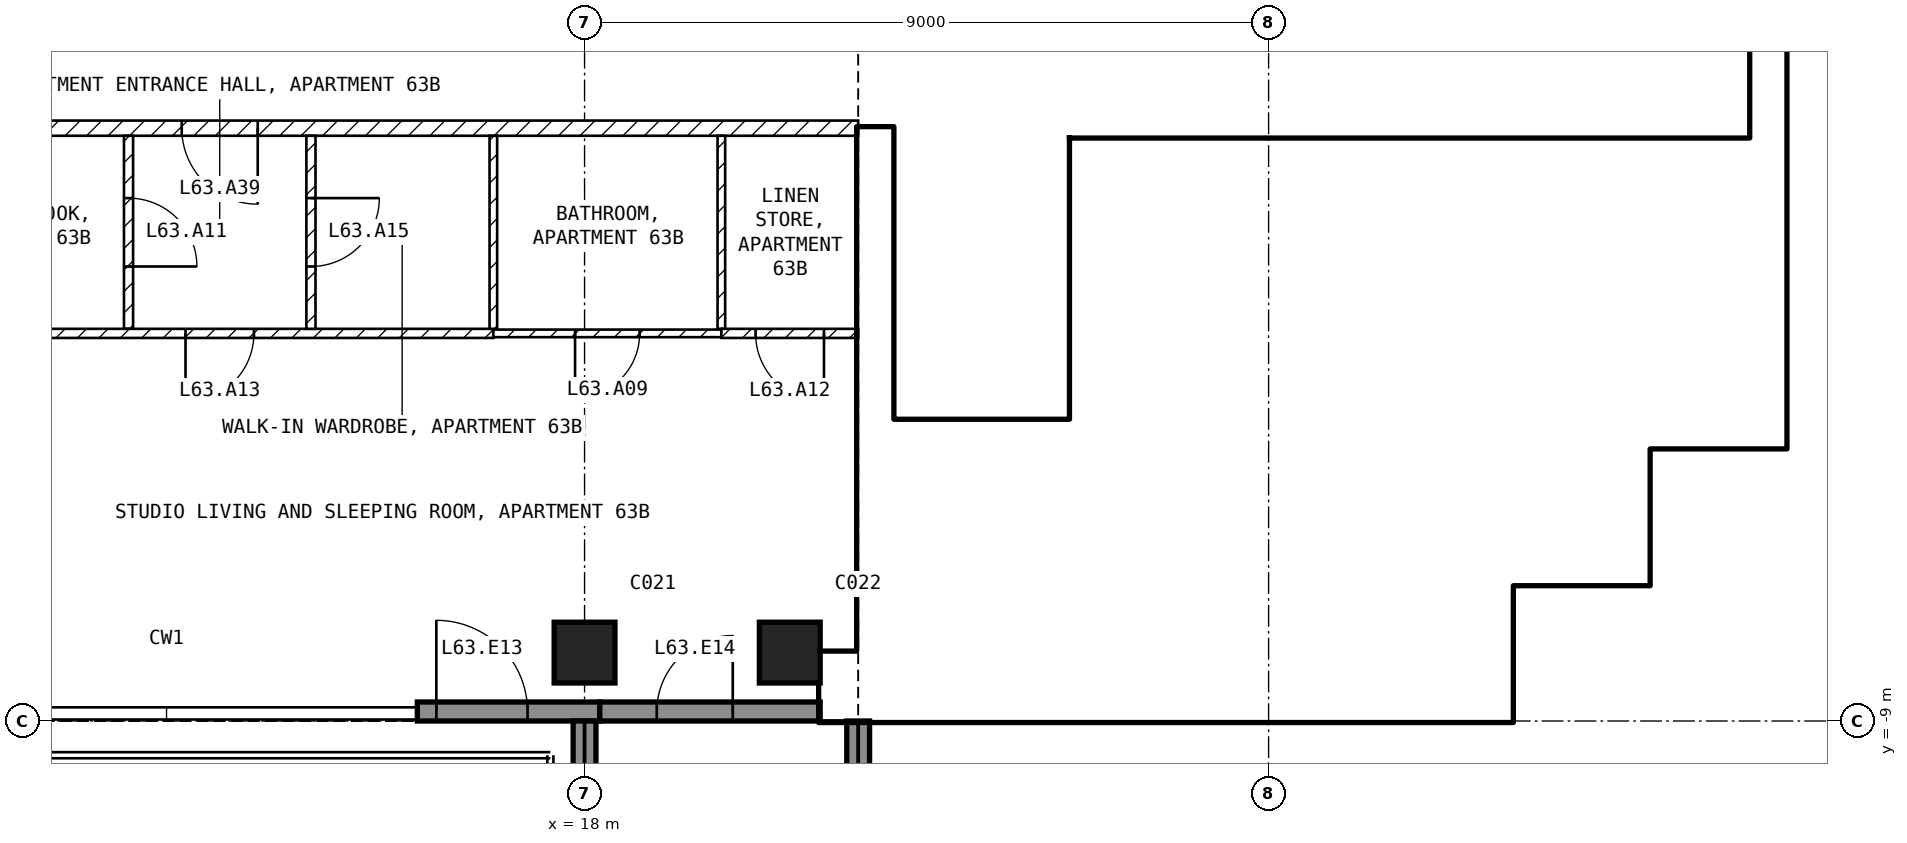
"""IFC4 building model, lengths in metres.
Left out: names, types, materials, properties, quantities, classifications, styles, units other than length and angle.
Written with IfcOpenShell. Run it as: python <this file> out.ifc"""

import sys

from ifc_helpers import new_model, si_unit, direction, frame, frame_2d, origin, origin_2d, place, context, subcontext, project, spatial, rectangle, extrude, element, fill, save


model = new_model("IFC4")
c1 = context("Model", 3, precision=1e-05, world=origin(), true_north=direction((0.0, 1.0)))
c2 = subcontext(c1, "Body", "Model", "MODEL_VIEW")
j1 = project(units=[si_unit("LENGTHUNIT", "METRE"), si_unit("PLANEANGLEUNIT", "RADIAN")], contexts=[c1])
p1 = place(None, origin())
s1 = spatial("IfcSite", under=j1, at=p1, CompositionType="ELEMENT")
p2 = place(p1, origin())
s2 = spatial("IfcBuilding", under=s1, at=p2, CompositionType="ELEMENT")
p3 = place(p2, frame((0.0, 0.0, 250.0)))
s3 = spatial("IfcBuildingStorey", under=s2, at=p3, CompositionType="ELEMENT", Elevation=250.0)
for number, where, z_axis, x_axis in (
    (1, (18.0, -8.1, -0.25), (0.0, 0.0, 1.0), (1.0, 0.0, 0.0)),
    (2, (20.7, -8.1, -0.25), (0.0, 0.0, 1.0), (1.0, 0.0, 0.0)),
):
    element("IfcColumn", number, at=place(p3, frame(where, z_axis=z_axis, x_axis=x_axis)), inside=s3, PredefinedType="COLUMN", context=c2, shape_type="SweptSolid", body=[
        extrude(rectangle(XDim=0.8, YDim=0.8, at=origin_2d()), origin(), (0.0, 0.0, 1.0), 3.5),
    ])
p4 = place(p3, frame((15.8, -8.875, 0.0), z_axis=(0.0, 0.0, 1.0), x_axis=(1.0, 0.0, 0.0)))
e3 = element("IfcWall", 3, at=p4, inside=s3, PredefinedType="SOLIDWALL", context=c2, shape_type="SweptSolid", body=[
    extrude(rectangle(XDim=2.4, YDim=0.25, at=frame_2d((1.2, 0.0))), origin(), (0.0, 0.0, 1.0), 3.25),
])
p5 = place(p4, frame((0.25, 0.0, 0.0)))
e4 = element("IfcOpeningElement", 4, at=p5, cuts=e3, PredefinedType="OPENING", context=c2, shape_type="SweptSolid", body=[
    extrude(rectangle(XDim=1.2, YDim=2.4, at=frame_2d((0.6, 1.2))), frame((0.0, 0.135, 0.0), z_axis=(0.0, -1.0, 0.0), x_axis=(1.0, 0.0, 0.0)), (0.0, 0.0, 1.0), 0.27),
])
p6 = place(p3, frame((18.2, -8.875, 0.0), z_axis=(0.0, 0.0, 1.0), x_axis=(1.0, 0.0, 0.0)))
e5 = element("IfcWall", 5, at=p6, inside=s3, PredefinedType="SOLIDWALL", context=c2, shape_type="SweptSolid", body=[
    extrude(rectangle(XDim=2.9, YDim=0.25, at=frame_2d((1.45, 0.0))), origin(), (0.0, 0.0, 1.0), 3.25),
])
p7 = place(p6, frame((0.75, 0.0, 0.0)))
e6 = element("IfcOpeningElement", 6, at=p7, cuts=e5, PredefinedType="OPENING", context=c2, shape_type="SweptSolid", body=[
    extrude(rectangle(XDim=1.0, YDim=2.4, at=frame_2d((0.5, 1.2))), frame((0.0, 0.135, 0.0), z_axis=(0.0, -1.0, 0.0), x_axis=(1.0, 0.0, 0.0)), (0.0, 0.0, 1.0), 0.27),
])
p8 = place(p3, frame((18.0, -9.0, 0.0), z_axis=(0.0, 0.0, 1.0), x_axis=(0.0, -1.0, 0.0)))
e7 = element("IfcWall", 7, at=p8, inside=s3, PredefinedType="SOLIDWALL", context=c2, shape_type="SweptSolid", body=[
    extrude(rectangle(XDim=2.74, YDim=0.3, at=frame_2d((1.37, 0.0))), origin(), (0.0, 0.0, 1.0), 3.25),
])
p9 = place(p3, frame((21.6, -9.0, 0.0), z_axis=(0.0, 0.0, 1.0), x_axis=(0.0, -1.0, 0.0)))
e8 = element("IfcWall", 8, at=p9, inside=s3, PredefinedType="SOLIDWALL", context=c2, shape_type="SweptSolid", body=[
    extrude(rectangle(XDim=2.7, YDim=0.3, at=frame_2d((1.35, 0.0))), origin(), (0.0, 0.0, 1.0), 3.25),
])
p10 = place(p3, frame((21.1, -8.55, 0.0), z_axis=(0.0, 0.0, 1.0), x_axis=(1.0, 0.0, 0.0)))
e9 = element("IfcWall", 9, at=p10, inside=s3, PredefinedType="SHEAR", context=c2, shape_type="SweptSolid", body=[
    extrude(rectangle(XDim=9.1, YDim=0.9, at=frame_2d((4.55, 0.0))), origin(), (0.0, 0.0, 1.0), 3.25),
])
p11 = place(p3, frame((29.975, -8.1, 0.0), z_axis=(0.0, 0.0, 1.0), x_axis=(0.0, 1.0, 0.0)))
e10 = element("IfcWall", 10, at=p11, inside=s3, PredefinedType="SHEAR", context=c2, shape_type="SweptSolid", body=[
    extrude(rectangle(XDim=1.35, YDim=0.45, at=frame_2d((0.675, 0.0))), origin(), (0.0, 0.0, 1.0), 3.25),
])
for number, where, z_axis, x_axis in (
    (11, (30.2, -6.975, 0.0), (0.0, 0.0, 1.0), (1.0, 0.0, 0.0)),
    (12, (31.775, -6.75, 0.0), (0.0, 0.0, 1.0), (0.0, 1.0, 0.0)),
    (13, (32.0, -5.175, 0.0), (0.0, 0.0, 1.0), (1.0, 0.0, 0.0)),
):
    element("IfcWall", number, at=place(p3, frame(where, z_axis=z_axis, x_axis=x_axis)), inside=s3, PredefinedType="SHEAR", context=c2, shape_type="SweptSolid", body=[
        extrude(rectangle(XDim=1.8, YDim=0.45, at=frame_2d((0.9, 0.0))), origin(), (0.0, 0.0, 1.0), 3.25),
    ])
p12 = place(p3, frame((33.575, -4.95, 0.0), z_axis=(0.0, 0.0, 1.0), x_axis=(0.0, 1.0, 0.0)))
e14 = element("IfcWall", 14, at=p12, inside=s3, PredefinedType="SHEAR", context=c2, shape_type="SweptSolid", body=[
    extrude(rectangle(XDim=10.35, YDim=0.45, at=frame_2d((5.175, 0.0))), origin(), (0.0, 0.0, 1.0), 3.25),
])
p13 = place(p3, frame((21.825, -8.1, 0.0), z_axis=(0.0, 0.0, 1.0), x_axis=(0.0, 1.0, 0.0)))
e15 = element("IfcWall", 15, at=p13, inside=s3, PredefinedType="SHEAR", context=c2, shape_type="SweptSolid", body=[
    extrude(rectangle(XDim=6.9, YDim=0.45, at=frame_2d((3.45, 0.0))), origin(), (0.0, 0.0, 1.0), 3.25),
])
p14 = place(p3, frame((24.5, -5.05, 0.0), z_axis=(0.0, 0.0, 1.0), x_axis=(0.0, 1.0, 0.0)))
e16 = element("IfcWall", 16, at=p14, inside=s3, PredefinedType="SOLIDWALL", context=c2, shape_type="SweptSolid", body=[
    extrude(rectangle(XDim=3.7, YDim=0.2, at=frame_2d((1.85, 0.0))), origin(), (0.0, 0.0, 1.0), 3.25),
])
p15 = place(p14, frame((0.1, 0.0, 0.0)))
e17 = element("IfcOpeningElement", 17, at=p15, cuts=e16, PredefinedType="OPENING", context=c2, shape_type="SweptSolid", body=[
    extrude(rectangle(XDim=0.8, YDim=2.1, at=frame_2d((0.4, 1.05))), frame((0.0, 0.11, 0.0), z_axis=(0.0, -1.0, 0.0), x_axis=(1.0, 0.0, 0.0)), (0.0, 0.0, 1.0), 0.22),
])
p16 = place(p3, frame((22.05, -5.15, 0.0), z_axis=(0.0, 0.0, 1.0), x_axis=(1.0, 0.0, 0.0)))
e18 = element("IfcWall", 18, at=p16, inside=s3, PredefinedType="SOLIDWALL", context=c2, shape_type="SweptSolid", body=[
    extrude(rectangle(XDim=6.3, YDim=0.2, at=frame_2d((3.15, 0.0))), origin(), (0.0, 0.0, 1.0), 3.25),
])
p17 = place(p16, frame((0.2, 0.0, 0.0)))
e19 = element("IfcOpeningElement", 19, at=p17, cuts=e18, PredefinedType="OPENING", context=c2, shape_type="SweptSolid", body=[
    extrude(rectangle(XDim=1.0, YDim=2.1, at=frame_2d((0.5, 1.05))), frame((0.0, 0.11, 0.0), z_axis=(0.0, -1.0, 0.0), x_axis=(1.0, 0.0, 0.0)), (0.0, 0.0, 1.0), 0.22),
])
p18 = place(p3, frame((28.25, -8.1, 0.0), z_axis=(0.0, 0.0, 1.0), x_axis=(0.0, 1.0, 0.0)))
e20 = element("IfcWall", 20, at=p18, inside=s3, PredefinedType="SOLIDWALL", context=c2, shape_type="SweptSolid", body=[
    extrude(rectangle(XDim=2.85, YDim=0.2, at=frame_2d((1.425, 0.0))), origin(), (0.0, 0.0, 1.0), 3.25),
])
p19 = place(p3, frame((24.6, -1.45, 0.0), z_axis=(0.0, 0.0, 1.0), x_axis=(1.0, 0.0, 0.0)))
e21 = element("IfcWall", 21, at=p19, inside=s3, PredefinedType="SOLIDWALL", context=c2, shape_type="SweptSolid", body=[
    extrude(rectangle(XDim=8.75, YDim=0.2, at=frame_2d((4.375, 0.0))), origin(), (0.0, 0.0, 1.0), 3.25),
])
p20 = place(p19, frame((0.4, 0.0, 0.0)))
e22 = element("IfcOpeningElement", 22, at=p20, cuts=e21, PredefinedType="OPENING", context=c2, shape_type="SweptSolid", body=[
    extrude(rectangle(XDim=1.0, YDim=2.1, at=frame_2d((0.5, 1.05))), frame((0.0, 0.11, 0.0), z_axis=(0.0, -1.0, 0.0), x_axis=(1.0, 0.0, 0.0)), (0.0, 0.0, 1.0), 0.22),
])
p21 = place(p19, frame((2.4, 0.0, 0.0)))
e23 = element("IfcOpeningElement", 23, at=p21, cuts=e21, PredefinedType="OPENING", context=c2, shape_type="SweptSolid", body=[
    extrude(rectangle(XDim=1.0, YDim=2.1, at=frame_2d((0.5, 1.05))), frame((0.0, 0.11, 0.0), z_axis=(0.0, -1.0, 0.0), x_axis=(1.0, 0.0, 0.0)), (0.0, 0.0, 1.0), 0.22),
])
p22 = place(p19, frame((4.4, 0.0, 0.0)))
e24 = element("IfcOpeningElement", 24, at=p22, cuts=e21, PredefinedType="OPENING", context=c2, shape_type="SweptSolid", body=[
    extrude(rectangle(XDim=1.0, YDim=2.1, at=frame_2d((0.5, 1.05))), frame((0.0, 0.11, 0.0), z_axis=(0.0, -1.0, 0.0), x_axis=(1.0, 0.0, 0.0)), (0.0, 0.0, 1.0), 0.22),
])
p23 = place(p19, frame((6.925, 0.0, 0.0)))
e25 = element("IfcOpeningElement", 25, at=p23, cuts=e21, PredefinedType="OPENING", context=c2, shape_type="SweptSolid", body=[
    extrude(rectangle(XDim=0.9, YDim=2.1, at=frame_2d((0.45, 1.05))), frame((0.0, 0.11, 0.0), z_axis=(0.0, -1.0, 0.0), x_axis=(1.0, 0.0, 0.0)), (0.0, 0.0, 1.0), 0.22),
])
p24 = place(p3, frame((24.6, -3.95, 0.0), z_axis=(0.0, 0.0, 1.0), x_axis=(1.0, 0.0, 0.0)))
e26 = element("IfcWall", 26, at=p24, inside=s3, PredefinedType="SOLIDWALL", context=c2, shape_type="SweptSolid", body=[
    extrude(rectangle(XDim=8.75, YDim=0.2, at=frame_2d((4.375, 0.0))), origin(), (0.0, 0.0, 1.0), 3.25),
])
for number, where, z_axis, x_axis in (
    (27, (26.5, -3.85, 0.0), (0.0, 0.0, 1.0), (0.0, 1.0, 0.0)),
    (28, (28.5, -3.85, 0.0), (0.0, 0.0, 1.0), (0.0, 1.0, 0.0)),
    (29, (30.5, -3.85, 0.0), (0.0, 0.0, 1.0), (0.0, 1.0, 0.0)),
):
    element("IfcWall", number, at=place(p3, frame(where, z_axis=z_axis, x_axis=x_axis)), inside=s3, PredefinedType="SOLIDWALL", context=c2, shape_type="SweptSolid", body=[
        extrude(rectangle(XDim=2.3, YDim=0.2, at=frame_2d((1.15, 0.0))), origin(), (0.0, 0.0, 1.0), 3.25),
    ])
p25 = place(p3, frame((21.6, -1.2, 0.0), z_axis=(0.0, 0.0, 1.0), x_axis=(-1.0, 0.0, 0.0)))
e30 = element("IfcWall", 30, at=p25, inside=s3, PredefinedType="PARTITIONING", context=c2, shape_type="SweptSolid", body=[
    extrude(rectangle(XDim=17.2, YDim=0.2, at=frame_2d((8.6, 0.0))), origin(), (0.0, 0.0, 1.0), 3.25),
])
p26 = place(p25, frame((7.9, 0.0, 0.0)))
e31 = element("IfcOpeningElement", 31, at=p26, cuts=e30, PredefinedType="OPENING", context=c2, shape_type="SweptSolid", body=[
    extrude(rectangle(XDim=1.0, YDim=2.1, at=frame_2d((0.5, 1.05))), frame((0.0, 0.11, 0.0), z_axis=(0.0, -1.0, 0.0), x_axis=(1.0, 0.0, 0.0)), (0.0, 0.0, 1.0), 0.22),
])
p27 = place(p3, frame((12.0, -1.3, 0.0), z_axis=(0.0, 0.0, 1.0), x_axis=(0.0, -1.0, 0.0)))
e32 = element("IfcWall", 32, at=p27, inside=s3, PredefinedType="PARTITIONING", context=c2, shape_type="SweptSolid", body=[
    extrude(rectangle(XDim=2.54, YDim=0.12, at=frame_2d((1.27, 0.0))), origin(), (0.0, 0.0, 1.0), 3.25),
])
p28 = place(p27, frame((0.82, 0.0, 0.0)))
e33 = element("IfcOpeningElement", 33, at=p28, cuts=e32, PredefinedType="OPENING", context=c2, shape_type="SweptSolid", body=[
    extrude(rectangle(XDim=0.9, YDim=2.1, at=frame_2d((0.45, 1.05))), frame((0.0, 0.07, 0.0), z_axis=(0.0, -1.0, 0.0), x_axis=(1.0, 0.0, 0.0)), (0.0, 0.0, 1.0), 0.14),
])
p29 = place(p3, frame((16.8, -3.9, 0.0), z_axis=(0.0, 0.0, 1.0), x_axis=(-1.0, 0.0, 0.0)))
e34 = element("IfcWall", 34, at=p29, inside=s3, PredefinedType="PARTITIONING", context=c2, shape_type="SweptSolid", body=[
    extrude(rectangle(XDim=7.86, YDim=0.12, at=frame_2d((3.93, 0.0))), origin(), (0.0, 0.0, 1.0), 3.25),
])
p30 = place(p29, frame((3.15, 0.0, 0.0)))
e35 = element("IfcOpeningElement", 35, at=p30, cuts=e34, PredefinedType="OPENING", context=c2, shape_type="SweptSolid", body=[
    extrude(rectangle(XDim=0.9, YDim=2.1, at=frame_2d((0.45, 1.05))), frame((0.0, 0.07, 0.0), z_axis=(0.0, -1.0, 0.0), x_axis=(1.0, 0.0, 0.0)), (0.0, 0.0, 1.0), 0.14),
])
p31 = place(p3, frame((14.4, -1.3, 0.0), z_axis=(0.0, 0.0, 1.0), x_axis=(0.0, -1.0, 0.0)))
e36 = element("IfcWall", 36, at=p31, inside=s3, PredefinedType="PARTITIONING", context=c2, shape_type="SweptSolid", body=[
    extrude(rectangle(XDim=2.54, YDim=0.12, at=frame_2d((1.27, 0.0))), origin(), (0.0, 0.0, 1.0), 3.25),
])
p32 = place(p31, frame((0.82, 0.0, 0.0)))
e37 = element("IfcOpeningElement", 37, at=p32, cuts=e36, PredefinedType="OPENING", context=c2, shape_type="SweptSolid", body=[
    extrude(rectangle(XDim=0.9, YDim=2.1, at=frame_2d((0.45, 1.05))), frame((0.0, 0.07, 0.0), z_axis=(0.0, -1.0, 0.0), x_axis=(1.0, 0.0, 0.0)), (0.0, 0.0, 1.0), 0.14),
])
for number, where, z_axis, x_axis in (
    (38, (16.8, -1.3, 0.0), (0.0, 0.0, 1.0), (0.0, -1.0, 0.0)),
    (39, (19.8, -1.3, 0.0), (0.0, 0.0, 1.0), (0.0, -1.0, 0.0)),
):
    element("IfcWall", number, at=place(p3, frame(where, z_axis=z_axis, x_axis=x_axis)), inside=s3, PredefinedType="PARTITIONING", context=c2, shape_type="SweptSolid", body=[
        extrude(rectangle(XDim=2.54, YDim=0.1, at=frame_2d((1.27, 0.0))), origin(), (0.0, 0.0, 1.0), 3.25),
    ])
p33 = place(p3, frame((19.8, -3.9, 0.0), z_axis=(0.0, 0.0, 1.0), x_axis=(-1.0, 0.0, 0.0)))
e40 = element("IfcWall", 40, at=p33, inside=s3, PredefinedType="PARTITIONING", context=c2, shape_type="SweptSolid", body=[
    extrude(rectangle(XDim=3.0, YDim=0.1, at=frame_2d((1.5, 0.0))), origin(), (0.0, 0.0, 1.0), 3.25),
])
p34 = place(p33, frame((1.075, 0.0, 0.0)))
e41 = element("IfcOpeningElement", 41, at=p34, cuts=e40, PredefinedType="OPENING", context=c2, shape_type="SweptSolid", body=[
    extrude(rectangle(XDim=0.85, YDim=2.1, at=frame_2d((0.425, 1.05))), frame((0.0, 0.06, 0.0), z_axis=(0.0, -1.0, 0.0), x_axis=(1.0, 0.0, 0.0)), (0.0, 0.0, 1.0), 0.12),
])
p35 = place(p3, frame((21.6, -3.9, 0.0), z_axis=(0.0, 0.0, 1.0), x_axis=(-1.0, 0.0, 0.0)))
e42 = element("IfcWall", 42, at=p35, inside=s3, PredefinedType="PARTITIONING", context=c2, shape_type="SweptSolid", body=[
    extrude(rectangle(XDim=1.8, YDim=0.12, at=frame_2d((0.9, 0.0))), origin(), (0.0, 0.0, 1.0), 3.25),
])
p36 = place(p35, frame((0.45, 0.0, 0.0)))
e43 = element("IfcOpeningElement", 43, at=p36, cuts=e42, PredefinedType="OPENING", context=c2, shape_type="SweptSolid", body=[
    extrude(rectangle(XDim=0.9, YDim=2.1, at=frame_2d((0.45, 1.05))), frame((0.0, 0.07, 0.0), z_axis=(0.0, -1.0, 0.0), x_axis=(1.0, 0.0, 0.0)), (0.0, 0.0, 1.0), 0.14),
])
p37 = place(p5, origin())
e44 = element("IfcDoor", 44, at=p37, inside=s3, OperationType="SINGLE_SWING_LEFT", PredefinedType="DOOR", context=c2, shape_type="SweptSolid", body=[
    extrude(rectangle(XDim=1.2, YDim=2.4, at=frame_2d((0.6, 1.2))), frame((0.0, 0.025, 0.0), z_axis=(0.0, -1.0, 0.0), x_axis=(1.0, 0.0, 0.0)), (0.0, 0.0, 1.0), 0.05),
])
fill(e4, e44)
p38 = place(p7, origin())
e45 = element("IfcDoor", 45, at=p38, inside=s3, OperationType="SINGLE_SWING_RIGHT", PredefinedType="DOOR", context=c2, shape_type="SweptSolid", body=[
    extrude(rectangle(XDim=1.0, YDim=2.4, at=frame_2d((0.5, 1.2))), frame((0.0, 0.025, 0.0), z_axis=(0.0, -1.0, 0.0), x_axis=(1.0, 0.0, 0.0)), (0.0, 0.0, 1.0), 0.05),
])
fill(e6, e45)
p39 = place(p20, origin())
e46 = element("IfcDoor", 46, at=p39, inside=s3, OperationType="DOUBLE_DOOR_SLIDING", PredefinedType="DOOR", context=c2, shape_type="SweptSolid", body=[
    extrude(rectangle(XDim=1.0, YDim=2.1, at=frame_2d((0.5, 1.05))), frame((0.0, 0.025, 0.0), z_axis=(0.0, -1.0, 0.0), x_axis=(1.0, 0.0, 0.0)), (0.0, 0.0, 1.0), 0.05),
])
fill(e22, e46)
p40 = place(p21, origin())
e47 = element("IfcDoor", 47, at=p40, inside=s3, OperationType="DOUBLE_DOOR_SLIDING", PredefinedType="DOOR", context=c2, shape_type="SweptSolid", body=[
    extrude(rectangle(XDim=1.0, YDim=2.1, at=frame_2d((0.5, 1.05))), frame((0.0, 0.025, 0.0), z_axis=(0.0, -1.0, 0.0), x_axis=(1.0, 0.0, 0.0)), (0.0, 0.0, 1.0), 0.05),
])
fill(e23, e47)
p41 = place(p22, origin())
e48 = element("IfcDoor", 48, at=p41, inside=s3, OperationType="DOUBLE_DOOR_SLIDING", PredefinedType="DOOR", context=c2, shape_type="SweptSolid", body=[
    extrude(rectangle(XDim=1.0, YDim=2.1, at=frame_2d((0.5, 1.05))), frame((0.0, 0.025, 0.0), z_axis=(0.0, -1.0, 0.0), x_axis=(1.0, 0.0, 0.0)), (0.0, 0.0, 1.0), 0.05),
])
fill(e24, e48)
p42 = place(p17, origin())
e49 = element("IfcDoor", 49, at=p42, inside=s3, OperationType="SINGLE_SWING_LEFT", PredefinedType="DOOR", context=c2, shape_type="SweptSolid", body=[
    extrude(rectangle(XDim=1.0, YDim=2.1, at=frame_2d((0.5, 1.05))), frame((0.0, 0.025, 0.0), z_axis=(0.0, -1.0, 0.0), x_axis=(1.0, 0.0, 0.0)), (0.0, 0.0, 1.0), 0.05),
])
fill(e19, e49)
p43 = place(p15, origin())
e50 = element("IfcDoor", 50, at=p43, inside=s3, OperationType="SINGLE_SWING_LEFT", PredefinedType="DOOR", context=c2, shape_type="SweptSolid", body=[
    extrude(rectangle(XDim=0.8, YDim=2.1, at=frame_2d((0.4, 1.05))), frame((0.0, 0.025, 0.0), z_axis=(0.0, -1.0, 0.0), x_axis=(1.0, 0.0, 0.0)), (0.0, 0.0, 1.0), 0.05),
])
fill(e17, e50)
p44 = place(p23, origin())
e51 = element("IfcDoor", 51, at=p44, inside=s3, OperationType="SINGLE_SWING_LEFT", PredefinedType="DOOR", context=c2, shape_type="SweptSolid", body=[
    extrude(rectangle(XDim=0.9, YDim=2.1, at=frame_2d((0.45, 1.05))), frame((0.0, 0.025, 0.0), z_axis=(0.0, -1.0, 0.0), x_axis=(1.0, 0.0, 0.0)), (0.0, 0.0, 1.0), 0.05),
])
fill(e25, e51)
p45 = place(p34, origin())
e52 = element("IfcDoor", 52, at=p45, inside=s3, OperationType="SINGLE_SWING_RIGHT", PredefinedType="DOOR", context=c2, shape_type="SweptSolid", body=[
    extrude(rectangle(XDim=0.85, YDim=2.1, at=frame_2d((0.425, 1.05))), frame((0.0, 0.025, 0.0), z_axis=(0.0, -1.0, 0.0), x_axis=(1.0, 0.0, 0.0)), (0.0, 0.0, 1.0), 0.05),
])
fill(e41, e52)
p46 = place(p28, origin())
e53 = element("IfcDoor", 53, at=p46, inside=s3, OperationType="SINGLE_SWING_RIGHT", PredefinedType="DOOR", context=c2, shape_type="SweptSolid", body=[
    extrude(rectangle(XDim=0.9, YDim=2.1, at=frame_2d((0.45, 1.05))), frame((0.0, 0.025, 0.0), z_axis=(0.0, -1.0, 0.0), x_axis=(1.0, 0.0, 0.0)), (0.0, 0.0, 1.0), 0.05),
])
fill(e33, e53)
p47 = place(p36, origin())
e54 = element("IfcDoor", 54, at=p47, inside=s3, OperationType="SINGLE_SWING_LEFT", PredefinedType="DOOR", context=c2, shape_type="SweptSolid", body=[
    extrude(rectangle(XDim=0.9, YDim=2.1, at=frame_2d((0.45, 1.05))), frame((0.0, 0.025, 0.0), z_axis=(0.0, -1.0, 0.0), x_axis=(1.0, 0.0, 0.0)), (0.0, 0.0, 1.0), 0.05),
])
fill(e43, e54)
p48 = place(p30, origin())
e55 = element("IfcDoor", 55, at=p48, inside=s3, OperationType="SINGLE_SWING_RIGHT", PredefinedType="DOOR", context=c2, shape_type="SweptSolid", body=[
    extrude(rectangle(XDim=0.9, YDim=2.1, at=frame_2d((0.45, 1.05))), frame((0.0, 0.025, 0.0), z_axis=(0.0, -1.0, 0.0), x_axis=(1.0, 0.0, 0.0)), (0.0, 0.0, 1.0), 0.05),
])
fill(e35, e55)
p49 = place(p32, origin())
e56 = element("IfcDoor", 56, at=p49, inside=s3, OperationType="SINGLE_SWING_LEFT", PredefinedType="DOOR", context=c2, shape_type="SweptSolid", body=[
    extrude(rectangle(XDim=0.9, YDim=2.1, at=frame_2d((0.45, 1.05))), frame((0.0, 0.025, 0.0), z_axis=(0.0, -1.0, 0.0), x_axis=(1.0, 0.0, 0.0)), (0.0, 0.0, 1.0), 0.05),
])
fill(e37, e56)
p50 = place(p26, origin())
e57 = element("IfcDoor", 57, at=p50, inside=s3, OperationType="SINGLE_SWING_LEFT", PredefinedType="DOOR", context=c2, shape_type="SweptSolid", body=[
    extrude(rectangle(XDim=1.0, YDim=2.1, at=frame_2d((0.5, 1.05))), frame((0.0, 0.025, 0.0), z_axis=(0.0, -1.0, 0.0), x_axis=(1.0, 0.0, 0.0)), (0.0, 0.0, 1.0), 0.05),
])
fill(e31, e57)
save(model, sys.argv[1])
